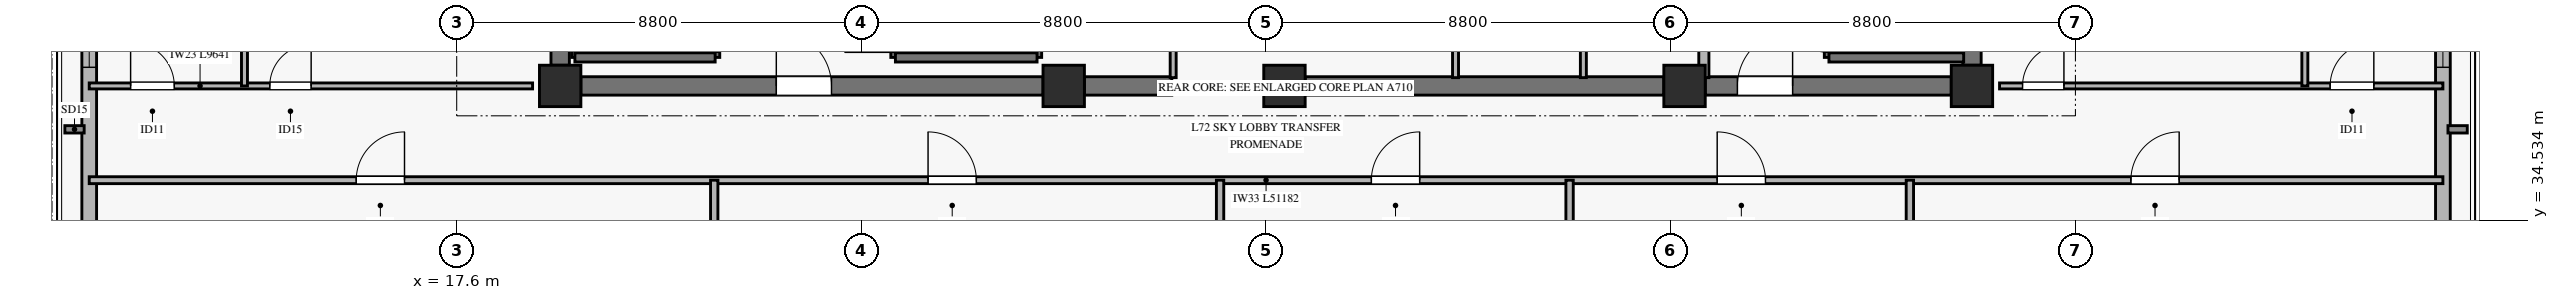
"""IFC4 building model, lengths in metres.
Left out: names, types, materials, properties, quantities, classifications, styles, units other than length and angle.
Written with IfcOpenShell. Run it as: python <this file> out.ifc"""

import sys

from ifc_helpers import new_model, si_unit, direction, frame, frame_2d, origin, origin_2d, place, context, subcontext, project, spatial, rectangle, extrude, source, transform, mapped, element, fill, save


model = new_model("IFC4")
c1 = context("Model", 3, precision=1e-05, world=origin(), true_north=direction((0.0, 1.0)))
c2 = subcontext(c1, "Body", "Model", "MODEL_VIEW")
j1 = project(units=[si_unit("LENGTHUNIT", "METRE"), si_unit("PLANEANGLEUNIT", "RADIAN")], contexts=[c1])
p1 = place(None, origin())
s1 = spatial("IfcSite", under=j1, at=p1, CompositionType="ELEMENT")
p2 = place(p1, origin())
s2 = spatial("IfcBuilding", under=s1, at=p2, CompositionType="ELEMENT")
p3 = place(p2, frame((0.0, 0.0, 279.1)))
s3 = spatial("IfcBuildingStorey", under=s2, at=p3, CompositionType="ELEMENT", Elevation=279.1)
m1 = source(origin(), c2, "Body", "SweptSolid", [
    extrude(rectangle(XDim=0.9, YDim=0.9, at=origin_2d()), origin(), (0.0, 0.0, 1.0), 6.52),
])
for number, where, z_axis, x_axis in (
    (1, (19.85, 37.45, 0.0), (0.0, 0.0, 1.0), (1.0, 0.0, 0.0)),
    (2, (30.8, 37.45, 0.0), (0.0, 0.0, 1.0), (1.0, 0.0, 0.0)),
    (3, (35.6, 37.45, 0.0), (0.0, 0.0, 1.0), (1.0, 0.0, 0.0)),
    (4, (44.3, 37.45, 0.0), (0.0, 0.0, 1.0), (1.0, 0.0, 0.0)),
    (5, (50.55, 37.45, 0.0), (0.0, 0.0, 1.0), (1.0, 0.0, 0.0)),
):
    element("IfcColumn", number, at=place(p3, frame(where, z_axis=z_axis, x_axis=x_axis)), inside=s3, PredefinedType="PILASTER", context=c2, shape_type="MappedRepresentation", body=[
        mapped(m1, transform((0.0, 0.0, 0.0), x_axis=(1.0, 0.0, 0.0), y_axis=(0.0, 1.0, 0.0), z_axis=(0.0, 0.0, 1.0), scale=1.0)),
    ])
p4 = place(p3, frame((20.3, 37.45, 0.0), z_axis=(0.0, 0.0, 1.0), x_axis=(1.0, 0.0, 0.0)))
e6 = element("IfcWall", 6, at=p4, inside=s3, PredefinedType="SHEAR", context=c2, shape_type="SweptSolid", body=[
    extrude(rectangle(XDim=10.05, YDim=0.4, at=frame_2d((5.025, 0.0))), origin(), (0.0, 0.0, 1.0), 6.52),
])
p5 = place(p4, frame((4.25, 0.0, 0.0)))
e7 = element("IfcOpeningElement", 7, at=p5, cuts=e6, PredefinedType="OPENING", context=c2, shape_type="SweptSolid", body=[
    extrude(rectangle(XDim=1.2, YDim=2.15, at=frame_2d((0.6, 1.075))), frame((0.0, 0.21, 0.0), z_axis=(0.0, -1.0, 0.0), x_axis=(1.0, 0.0, 0.0)), (0.0, 0.0, 1.0), 0.42),
])
p6 = place(p3, frame((31.25, 37.45, 0.0), z_axis=(0.0, 0.0, 1.0), x_axis=(1.0, 0.0, 0.0)))
e8 = element("IfcWall", 8, at=p6, inside=s3, PredefinedType="SHEAR", context=c2, shape_type="SweptSolid", body=[
    extrude(rectangle(XDim=1.9, YDim=0.4, at=frame_2d((0.95, 0.0))), origin(), (0.0, 0.0, 1.0), 6.52),
])
p7 = place(p3, frame((36.05, 37.45, 0.0), z_axis=(0.0, 0.0, 1.0), x_axis=(1.0, 0.0, 0.0)))
e9 = element("IfcWall", 9, at=p7, inside=s3, PredefinedType="SHEAR", context=c2, shape_type="SweptSolid", body=[
    extrude(rectangle(XDim=7.8, YDim=0.4, at=frame_2d((3.9, 0.0))), origin(), (0.0, 0.0, 1.0), 6.52),
])
p8 = place(p3, frame((44.75, 37.45, 0.0), z_axis=(0.0, 0.0, 1.0), x_axis=(1.0, 0.0, 0.0)))
e10 = element("IfcWall", 10, at=p8, inside=s3, PredefinedType="SHEAR", context=c2, shape_type="SweptSolid", body=[
    extrude(rectangle(XDim=5.35, YDim=0.4, at=frame_2d((2.675, 0.0))), origin(), (0.0, 0.0, 1.0), 6.52),
])
p9 = place(p8, frame((0.7, 0.0, 0.0)))
e11 = element("IfcOpeningElement", 11, at=p9, cuts=e10, PredefinedType="OPENING", context=c2, shape_type="SweptSolid", body=[
    extrude(rectangle(XDim=1.2, YDim=2.15, at=frame_2d((0.6, 1.075))), frame((0.0, 0.21, 0.0), z_axis=(0.0, -1.0, 0.0), x_axis=(1.0, 0.0, 0.0)), (0.0, 0.0, 1.0), 0.42),
])
for number, where, z_axis, x_axis in (
    (12, (19.85, 37.9, 0.0), (0.0, 0.0, 1.0), (0.0, 1.0, 0.0)),
    (13, (50.55, 37.9, 0.0), (0.0, 0.0, 1.0), (0.0, 1.0, 0.0)),
):
    element("IfcWall", number, at=place(p3, frame(where, z_axis=z_axis, x_axis=x_axis)), inside=s3, PredefinedType="SHEAR", context=c2, shape_type="SweptSolid", body=[
        extrude(rectangle(XDim=8.2, YDim=0.4, at=frame_2d((4.1, 0.0))), origin(), (0.0, 0.0, 1.0), 6.52),
    ])
p10 = place(p3, frame((9.609, 32.229, 0.0), z_axis=(0.0, 0.0, 1.0), x_axis=(0.0, 1.0, 0.0)))
e14 = element("IfcWall", 14, at=p10, inside=s3, PredefinedType="SOLIDWALL", context=c2, shape_type="SweptSolid", body=[
    extrude(rectangle(XDim=11.393, YDim=0.32, at=frame_2d((5.697, 0.0))), origin(), (0.0, 0.0, 1.0), 6.15),
])
p11 = place(p10, frame((5.626, 0.0, 0.45)))
e15 = element("IfcOpeningElement", 15, at=p11, cuts=e14, PredefinedType="OPENING", context=c2, shape_type="SweptSolid", body=[
    extrude(rectangle(XDim=2.6, YDim=2.4, at=frame_2d((1.3, 1.2))), frame((0.0, 0.17, 0.0), z_axis=(0.0, -1.0, 0.0), x_axis=(1.0, 0.0, 0.0)), (0.0, 0.0, 1.0), 0.34),
])
p12 = place(p3, frame((60.791, 32.229, 0.0), z_axis=(0.0, 0.0, 1.0), x_axis=(0.0, 1.0, 0.0)))
e16 = element("IfcWall", 16, at=p12, inside=s3, PredefinedType="SOLIDWALL", context=c2, shape_type="SweptSolid", body=[
    extrude(rectangle(XDim=11.393, YDim=0.32, at=frame_2d((5.697, 0.0))), origin(), (0.0, 0.0, 1.0), 6.15),
])
p13 = place(p12, frame((5.626, 0.0, 0.45)))
e17 = element("IfcOpeningElement", 17, at=p13, cuts=e16, PredefinedType="OPENING", context=c2, shape_type="SweptSolid", body=[
    extrude(rectangle(XDim=2.6, YDim=2.4, at=frame_2d((1.3, 1.2))), frame((0.0, 0.17, 0.0), z_axis=(0.0, -1.0, 0.0), x_axis=(1.0, 0.0, 0.0)), (0.0, 0.0, 1.0), 0.34),
])
p14 = place(p3, frame((20.17, 38.07, 0.0), z_axis=(0.0, 0.0, 1.0), x_axis=(0.0, 1.0, 0.0)))
e18 = element("IfcWall", 18, at=p14, inside=s3, PredefinedType="SOLIDWALL", context=c2, shape_type="SweptSolid", body=[
    extrude(rectangle(XDim=7.25, YDim=0.14, at=frame_2d((3.625, 0.0))), origin(), (0.0, 0.0, 1.0), 6.8),
])
p15 = place(p3, frame((23.22, 38.07, 0.0), z_axis=(0.0, 0.0, 1.0), x_axis=(0.0, 1.0, 0.0)))
e19 = element("IfcWall", 19, at=p15, inside=s3, PredefinedType="SOLIDWALL", context=c2, shape_type="SweptSolid", body=[
    extrude(rectangle(XDim=7.25, YDim=0.2, at=frame_2d((3.625, 0.0))), origin(), (0.0, 0.0, 1.0), 6.8),
])
p16 = place(p15, frame((0.11, 0.0, 0.0)))
e20 = element("IfcOpeningElement", 20, at=p16, cuts=e19, PredefinedType="OPENING", context=c2, shape_type="SweptSolid", body=[
    extrude(rectangle(XDim=1.1, YDim=2.15, at=frame_2d((0.55, 1.075))), frame((0.0, 0.11, 0.0), z_axis=(0.0, -1.0, 0.0), x_axis=(1.0, 0.0, 0.0)), (0.0, 0.0, 1.0), 0.22),
])
p17 = place(p3, frame((20.17, 38.07, 0.0), z_axis=(0.0, 0.0, 1.0), x_axis=(1.0, 0.0, 0.0)))
e21 = element("IfcWall", 21, at=p17, inside=s3, PredefinedType="SOLIDWALL", context=c2, shape_type="SweptSolid", body=[
    extrude(rectangle(XDim=3.05, YDim=0.2, at=frame_2d((1.525, 0.0))), origin(), (0.0, 0.0, 1.0), 6.8),
])
p18 = place(p3, frame((27.14, 38.07, 0.0), z_axis=(0.0, 0.0, 1.0), x_axis=(0.0, 1.0, 0.0)))
e22 = element("IfcWall", 22, at=p18, inside=s3, PredefinedType="SOLIDWALL", context=c2, shape_type="SweptSolid", body=[
    extrude(rectangle(XDim=7.25, YDim=0.2, at=frame_2d((3.625, 0.0))), origin(), (0.0, 0.0, 1.0), 6.8),
])
p19 = place(p18, frame((0.11, 0.0, 0.0)))
e23 = element("IfcOpeningElement", 23, at=p19, cuts=e22, PredefinedType="OPENING", context=c2, shape_type="SweptSolid", body=[
    extrude(rectangle(XDim=1.1, YDim=2.15, at=frame_2d((0.55, 1.075))), frame((0.0, 0.11, 0.0), z_axis=(0.0, -1.0, 0.0), x_axis=(1.0, 0.0, 0.0)), (0.0, 0.0, 1.0), 0.22),
])
p20 = place(p3, frame((30.22, 38.07, 0.0), z_axis=(0.0, 0.0, 1.0), x_axis=(0.0, 1.0, 0.0)))
e24 = element("IfcWall", 24, at=p20, inside=s3, PredefinedType="SOLIDWALL", context=c2, shape_type="SweptSolid", body=[
    extrude(rectangle(XDim=7.25, YDim=0.2, at=frame_2d((3.625, 0.0))), origin(), (0.0, 0.0, 1.0), 6.8),
])
p21 = place(p3, frame((27.14, 38.07, 0.0), z_axis=(0.0, 0.0, 1.0), x_axis=(1.0, 0.0, 0.0)))
e25 = element("IfcWall", 25, at=p21, inside=s3, PredefinedType="SOLIDWALL", context=c2, shape_type="SweptSolid", body=[
    extrude(rectangle(XDim=3.08, YDim=0.2, at=frame_2d((1.54, 0.0))), origin(), (0.0, 0.0, 1.0), 6.8),
])
p22 = place(p3, frame((47.44, 38.07, 0.0), z_axis=(0.0, 0.0, 1.0), x_axis=(0.0, 1.0, 0.0)))
e26 = element("IfcWall", 26, at=p22, inside=s3, PredefinedType="SOLIDWALL", context=c2, shape_type="SweptSolid", body=[
    extrude(rectangle(XDim=7.25, YDim=0.2, at=frame_2d((3.625, 0.0))), origin(), (0.0, 0.0, 1.0), 6.8),
])
p23 = place(p22, frame((0.11, 0.0, 0.0)))
e27 = element("IfcOpeningElement", 27, at=p23, cuts=e26, PredefinedType="OPENING", context=c2, shape_type="SweptSolid", body=[
    extrude(rectangle(XDim=1.1, YDim=2.15, at=frame_2d((0.55, 1.075))), frame((0.0, 0.11, 0.0), z_axis=(0.0, -1.0, 0.0), x_axis=(1.0, 0.0, 0.0)), (0.0, 0.0, 1.0), 0.22),
])
p24 = place(p3, frame((47.44, 38.07, 0.0), z_axis=(0.0, 0.0, 1.0), x_axis=(1.0, 0.0, 0.0)))
e28 = element("IfcWall", 28, at=p24, inside=s3, PredefinedType="SOLIDWALL", context=c2, shape_type="SweptSolid", body=[
    extrude(rectangle(XDim=2.93, YDim=0.2, at=frame_2d((1.465, 0.0))), origin(), (0.0, 0.0, 1.0), 6.8),
])
p25 = place(p3, frame((44.72, 37.63, 0.0), z_axis=(0.0, 0.0, 1.0), x_axis=(0.0, 1.0, 0.0)))
e29 = element("IfcWall", 29, at=p25, inside=s3, PredefinedType="SOLIDWALL", context=c2, shape_type="SweptSolid", body=[
    extrude(rectangle(XDim=7.59, YDim=0.22, at=frame_2d((3.795, 0.0))), origin(), (0.0, 0.0, 1.0), 6.52),
])
p26 = place(p3, frame((33.18, 37.63, 0.0), z_axis=(0.0, 0.0, 1.0), x_axis=(0.0, 1.0, 0.0)))
e30 = element("IfcWall", 30, at=p26, inside=s3, PredefinedType="PARTITIONING", context=c2, shape_type="SweptSolid", body=[
    extrude(rectangle(XDim=6.52, YDim=0.13, at=frame_2d((3.26, 0.0))), origin(), (0.0, 0.0, 1.0), 5.605),
])
p27 = place(p26, frame((2.27, 0.0, 0.0)))
e31 = element("IfcOpeningElement", 31, at=p27, cuts=e30, PredefinedType="OPENING", context=c2, shape_type="SweptSolid", body=[
    extrude(rectangle(XDim=0.9, YDim=2.1, at=frame_2d((0.45, 1.05))), frame((0.0, 0.075, 0.0), z_axis=(0.0, -1.0, 0.0), x_axis=(1.0, 0.0, 0.0)), (0.0, 0.0, 1.0), 0.15),
])
p28 = place(p3, frame((39.32, 37.63, 0.0), z_axis=(0.0, 0.0, 1.0), x_axis=(0.0, 1.0, 0.0)))
e32 = element("IfcWall", 32, at=p28, inside=s3, PredefinedType="PARTITIONING", context=c2, shape_type="SweptSolid", body=[
    extrude(rectangle(XDim=8.74, YDim=0.13, at=frame_2d((4.37, 0.0))), origin(), (0.0, 0.0, 1.0), 6.52),
])
p29 = place(p28, frame((4.89, 0.0, 0.0)))
e33 = element("IfcOpeningElement", 33, at=p29, cuts=e32, PredefinedType="OPENING", context=c2, shape_type="SweptSolid", body=[
    extrude(rectangle(XDim=0.9, YDim=2.1, at=frame_2d((0.45, 1.05))), frame((0.0, 0.075, 0.0), z_axis=(0.0, -1.0, 0.0), x_axis=(1.0, 0.0, 0.0)), (0.0, 0.0, 1.0), 0.15),
])
p30 = place(p3, frame((42.1, 37.63, 0.0), z_axis=(0.0, 0.0, 1.0), x_axis=(0.0, 1.0, 0.0)))
e34 = element("IfcWall", 34, at=p30, inside=s3, PredefinedType="PARTITIONING", context=c2, shape_type="SweptSolid", body=[
    extrude(rectangle(XDim=8.74, YDim=0.13, at=frame_2d((4.37, 0.0))), origin(), (0.0, 0.0, 1.0), 6.52),
])
p31 = place(p30, frame((2.17, 0.0, 0.0)))
e35 = element("IfcOpeningElement", 35, at=p31, cuts=e34, PredefinedType="OPENING", context=c2, shape_type="SweptSolid", body=[
    extrude(rectangle(XDim=0.9, YDim=2.1, at=frame_2d((0.45, 1.05))), frame((0.0, 0.075, 0.0), z_axis=(0.0, -1.0, 0.0), x_axis=(1.0, 0.0, 0.0)), (0.0, 0.0, 1.0), 0.15),
])
p32 = place(p3, frame((9.609, 35.4, 0.0), z_axis=(0.0, 0.0, 1.0), x_axis=(1.0, 0.0, 0.0)))
e36 = element("IfcWall", 36, at=p32, inside=s3, PredefinedType="PARTITIONING", context=c2, shape_type="SweptSolid", body=[
    extrude(rectangle(XDim=51.182, YDim=0.15, at=frame_2d((25.591, 0.0))), origin(), (0.0, 0.0, 1.0), 5.805),
])
p33 = place(p32, frame((5.806, 0.0, 0.0)))
e37 = element("IfcOpeningElement", 37, at=p33, cuts=e36, PredefinedType="OPENING", context=c2, shape_type="SweptSolid", body=[
    extrude(rectangle(XDim=1.05, YDim=2.15, at=frame_2d((0.525, 1.075))), frame((0.0, 0.085, 0.0), z_axis=(0.0, -1.0, 0.0), x_axis=(1.0, 0.0, 0.0)), (0.0, 0.0, 1.0), 0.17),
])
p34 = place(p32, frame((18.241, 0.0, 0.0)))
e38 = element("IfcOpeningElement", 38, at=p34, cuts=e36, PredefinedType="OPENING", context=c2, shape_type="SweptSolid", body=[
    extrude(rectangle(XDim=1.05, YDim=2.15, at=frame_2d((0.525, 1.075))), frame((0.0, 0.085, 0.0), z_axis=(0.0, -1.0, 0.0), x_axis=(1.0, 0.0, 0.0)), (0.0, 0.0, 1.0), 0.17),
])
p35 = place(p32, frame((27.881, 0.0, 0.0)))
e39 = element("IfcOpeningElement", 39, at=p35, cuts=e36, PredefinedType="OPENING", context=c2, shape_type="SweptSolid", body=[
    extrude(rectangle(XDim=1.05, YDim=2.15, at=frame_2d((0.525, 1.075))), frame((0.0, 0.085, 0.0), z_axis=(0.0, -1.0, 0.0), x_axis=(1.0, 0.0, 0.0)), (0.0, 0.0, 1.0), 0.17),
])
p36 = place(p32, frame((35.401, 0.0, 0.0)))
e40 = element("IfcOpeningElement", 40, at=p36, cuts=e36, PredefinedType="OPENING", context=c2, shape_type="SweptSolid", body=[
    extrude(rectangle(XDim=1.05, YDim=2.15, at=frame_2d((0.525, 1.075))), frame((0.0, 0.085, 0.0), z_axis=(0.0, -1.0, 0.0), x_axis=(1.0, 0.0, 0.0)), (0.0, 0.0, 1.0), 0.17),
])
p37 = place(p32, frame((44.397, 0.0, 0.0)))
e41 = element("IfcOpeningElement", 41, at=p37, cuts=e36, PredefinedType="OPENING", context=c2, shape_type="SweptSolid", body=[
    extrude(rectangle(XDim=1.05, YDim=2.15, at=frame_2d((0.525, 1.075))), frame((0.0, 0.085, 0.0), z_axis=(0.0, -1.0, 0.0), x_axis=(1.0, 0.0, 0.0)), (0.0, 0.0, 1.0), 0.17),
])
for number, where, z_axis, x_axis in (
    (42, (23.2, 17.908, 0.0), (0.0, 0.0, 1.0), (0.0, 1.0, 0.0)),
    (43, (34.2, 17.908, 0.0), (0.0, 0.0, 1.0), (0.0, 1.0, 0.0)),
    (44, (41.8, 17.908, 0.0), (0.0, 0.0, 1.0), (0.0, 1.0, 0.0)),
    (45, (49.2, 17.908, 0.0), (0.0, 0.0, 1.0), (0.0, 1.0, 0.0)),
):
    element("IfcWall", number, at=place(p3, frame(where, z_axis=z_axis, x_axis=x_axis)), inside=s3, PredefinedType="PARTITIONING", context=c2, shape_type="SweptSolid", body=[
        extrude(rectangle(XDim=17.492, YDim=0.16, at=frame_2d((8.746, 0.0))), origin(), (0.0, 0.0, 1.0), 6.105),
    ])
p38 = place(p3, frame((9.609, 37.45, 0.0), z_axis=(0.0, 0.0, 1.0), x_axis=(1.0, 0.0, 0.0)))
e46 = element("IfcWall", 46, at=p38, inside=s3, PredefinedType="PARTITIONING", context=c2, shape_type="SweptSolid", body=[
    extrude(rectangle(XDim=9.641, YDim=0.13, at=frame_2d((4.821, 0.0))), origin(), (0.0, 0.0, 1.0), 6.155),
])
p39 = place(p38, frame((0.9, 0.0, 0.0)))
e47 = element("IfcOpeningElement", 47, at=p39, cuts=e46, PredefinedType="OPENING", context=c2, shape_type="SweptSolid", body=[
    extrude(rectangle(XDim=0.95, YDim=2.1, at=frame_2d((0.475, 1.05))), frame((0.0, 0.075, 0.0), z_axis=(0.0, -1.0, 0.0), x_axis=(1.0, 0.0, 0.0)), (0.0, 0.0, 1.0), 0.15),
])
p40 = place(p38, frame((3.926, 0.0, 0.0)))
e48 = element("IfcOpeningElement", 48, at=p40, cuts=e46, PredefinedType="OPENING", context=c2, shape_type="SweptSolid", body=[
    extrude(rectangle(XDim=0.9, YDim=2.1, at=frame_2d((0.45, 1.05))), frame((0.0, 0.075, 0.0), z_axis=(0.0, -1.0, 0.0), x_axis=(1.0, 0.0, 0.0)), (0.0, 0.0, 1.0), 0.15),
])
p41 = place(p3, frame((12.985, 37.45, 0.0), z_axis=(0.0, 0.0, 1.0), x_axis=(0.0, 1.0, 0.0)))
e49 = element("IfcWall", 49, at=p41, inside=s3, PredefinedType="PARTITIONING", context=c2, shape_type="SweptSolid", body=[
    extrude(rectangle(XDim=8.8, YDim=0.13, at=frame_2d((4.4, 0.0))), origin(), (0.0, 0.0, 1.0), 6.52),
])
p42 = place(p3, frame((51.15, 37.45, 0.0), z_axis=(0.0, 0.0, 1.0), x_axis=(1.0, 0.0, 0.0)))
e50 = element("IfcWall", 50, at=p42, inside=s3, PredefinedType="PARTITIONING", context=c2, shape_type="SweptSolid", body=[
    extrude(rectangle(XDim=9.641, YDim=0.13, at=frame_2d((4.821, 0.0))), origin(), (0.0, 0.0, 1.0), 6.155),
])
p43 = place(p42, frame((0.5, 0.0, 0.0)))
e51 = element("IfcOpeningElement", 51, at=p43, cuts=e50, PredefinedType="OPENING", context=c2, shape_type="SweptSolid", body=[
    extrude(rectangle(XDim=0.9, YDim=2.1, at=frame_2d((0.45, 1.05))), frame((0.0, 0.075, 0.0), z_axis=(0.0, -1.0, 0.0), x_axis=(1.0, 0.0, 0.0)), (0.0, 0.0, 1.0), 0.15),
])
p44 = place(p42, frame((7.189, 0.0, 0.0)))
e52 = element("IfcOpeningElement", 52, at=p44, cuts=e50, PredefinedType="OPENING", context=c2, shape_type="SweptSolid", body=[
    extrude(rectangle(XDim=0.95, YDim=2.1, at=frame_2d((0.475, 1.05))), frame((0.0, 0.075, 0.0), z_axis=(0.0, -1.0, 0.0), x_axis=(1.0, 0.0, 0.0)), (0.0, 0.0, 1.0), 0.15),
])
p45 = place(p3, frame((57.789, 37.45, 0.0), z_axis=(0.0, 0.0, 1.0), x_axis=(0.0, 1.0, 0.0)))
e53 = element("IfcWall", 53, at=p45, inside=s3, PredefinedType="PARTITIONING", context=c2, shape_type="SweptSolid", body=[
    extrude(rectangle(XDim=8.8, YDim=0.13, at=frame_2d((4.4, 0.0))), origin(), (0.0, 0.0, 1.0), 6.52),
])
m2 = source(origin(), c2, "Body", "SweptSolid", [
    extrude(rectangle(XDim=2.6, YDim=2.4, at=frame_2d((1.3, 1.2))), frame((0.0, 0.03, 0.0), z_axis=(0.0, -1.0, 0.0), x_axis=(1.0, 0.0, 0.0)), (0.0, 0.0, 1.0), 0.06),
])
p46 = place(p11, origin())
e54 = element("IfcWindow", 54, at=p46, inside=s3, PartitioningType="SINGLE_PANEL", PredefinedType="WINDOW", context=c2, shape_type="MappedRepresentation", body=[
    mapped(m2, transform((0.0, 0.0, 0.0), x_axis=(1.0, 0.0, 0.0), y_axis=(0.0, 1.0, 0.0), z_axis=(0.0, 0.0, 1.0), scale=1.0)),
])
fill(e15, e54)
p47 = place(p13, origin())
e55 = element("IfcWindow", 55, at=p47, inside=s3, PartitioningType="SINGLE_PANEL", PredefinedType="WINDOW", context=c2, shape_type="MappedRepresentation", body=[
    mapped(m2, transform((0.0, 0.0, 0.0), x_axis=(1.0, 0.0, 0.0), y_axis=(0.0, 1.0, 0.0), z_axis=(0.0, 0.0, 1.0), scale=1.0)),
])
fill(e17, e55)
m3 = source(origin(), c2, "Body", "SweptSolid", [
    extrude(rectangle(XDim=1.2, YDim=2.15, at=frame_2d((0.6, 1.075))), frame((0.0, 0.025, 0.0), z_axis=(0.0, -1.0, 0.0), x_axis=(1.0, 0.0, 0.0)), (0.0, 0.0, 1.0), 0.05),
])
p48 = place(p5, origin())
e56 = element("IfcDoor", 56, at=p48, inside=s3, OperationType="SINGLE_SWING_LEFT", PredefinedType="DOOR", context=c2, shape_type="MappedRepresentation", body=[
    mapped(m3, transform((0.0, 0.0, 0.0), x_axis=(1.0, 0.0, 0.0), y_axis=(0.0, 1.0, 0.0), z_axis=(0.0, 0.0, 1.0), scale=1.0)),
])
fill(e7, e56)
p49 = place(p9, origin())
e57 = element("IfcDoor", 57, at=p49, inside=s3, OperationType="SINGLE_SWING_RIGHT", PredefinedType="DOOR", context=c2, shape_type="MappedRepresentation", body=[
    mapped(m3, transform((0.0, 0.0, 0.0), x_axis=(1.0, 0.0, 0.0), y_axis=(0.0, 1.0, 0.0), z_axis=(0.0, 0.0, 1.0), scale=1.0)),
])
fill(e11, e57)
m4 = source(origin(), c2, "Body", "SweptSolid", [
    extrude(rectangle(XDim=1.05, YDim=2.15, at=frame_2d((0.525, 1.075))), frame((0.0, 0.025, 0.0), z_axis=(0.0, -1.0, 0.0), x_axis=(1.0, 0.0, 0.0)), (0.0, 0.0, 1.0), 0.05),
])
p50 = place(p33, origin())
e58 = element("IfcDoor", 58, at=p50, inside=s3, OperationType="SINGLE_SWING_RIGHT", PredefinedType="DOOR", context=c2, shape_type="MappedRepresentation", body=[
    mapped(m4, transform((0.0, 0.0, 0.0), x_axis=(1.0, 0.0, 0.0), y_axis=(0.0, 1.0, 0.0), z_axis=(0.0, 0.0, 1.0), scale=1.0)),
])
fill(e37, e58)
p51 = place(p34, origin())
e59 = element("IfcDoor", 59, at=p51, inside=s3, OperationType="SINGLE_SWING_LEFT", PredefinedType="DOOR", context=c2, shape_type="MappedRepresentation", body=[
    mapped(m4, transform((0.0, 0.0, 0.0), x_axis=(1.0, 0.0, 0.0), y_axis=(0.0, 1.0, 0.0), z_axis=(0.0, 0.0, 1.0), scale=1.0)),
])
fill(e38, e59)
p52 = place(p35, origin())
e60 = element("IfcDoor", 60, at=p52, inside=s3, OperationType="SINGLE_SWING_RIGHT", PredefinedType="DOOR", context=c2, shape_type="MappedRepresentation", body=[
    mapped(m4, transform((0.0, 0.0, 0.0), x_axis=(1.0, 0.0, 0.0), y_axis=(0.0, 1.0, 0.0), z_axis=(0.0, 0.0, 1.0), scale=1.0)),
])
fill(e39, e60)
p53 = place(p36, origin())
e61 = element("IfcDoor", 61, at=p53, inside=s3, OperationType="SINGLE_SWING_LEFT", PredefinedType="DOOR", context=c2, shape_type="MappedRepresentation", body=[
    mapped(m4, transform((0.0, 0.0, 0.0), x_axis=(1.0, 0.0, 0.0), y_axis=(0.0, 1.0, 0.0), z_axis=(0.0, 0.0, 1.0), scale=1.0)),
])
fill(e40, e61)
p54 = place(p37, origin())
e62 = element("IfcDoor", 62, at=p54, inside=s3, OperationType="SINGLE_SWING_RIGHT", PredefinedType="DOOR", context=c2, shape_type="MappedRepresentation", body=[
    mapped(m4, transform((0.0, 0.0, 0.0), x_axis=(1.0, 0.0, 0.0), y_axis=(0.0, 1.0, 0.0), z_axis=(0.0, 0.0, 1.0), scale=1.0)),
])
fill(e41, e62)
m5 = source(origin(), c2, "Body", "SweptSolid", [
    extrude(rectangle(XDim=0.95, YDim=2.1, at=frame_2d((0.475, 1.05))), frame((0.0, 0.025, 0.0), z_axis=(0.0, -1.0, 0.0), x_axis=(1.0, 0.0, 0.0)), (0.0, 0.0, 1.0), 0.05),
])
p55 = place(p39, origin())
e63 = element("IfcDoor", 63, at=p55, inside=s3, OperationType="SINGLE_SWING_LEFT", PredefinedType="DOOR", context=c2, shape_type="MappedRepresentation", body=[
    mapped(m5, transform((0.0, 0.0, 0.0), x_axis=(1.0, 0.0, 0.0), y_axis=(0.0, 1.0, 0.0), z_axis=(0.0, 0.0, 1.0), scale=1.0)),
])
fill(e47, e63)
m6 = source(origin(), c2, "Body", "SweptSolid", [
    extrude(rectangle(XDim=0.9, YDim=2.1, at=frame_2d((0.45, 1.05))), frame((0.0, 0.025, 0.0), z_axis=(0.0, -1.0, 0.0), x_axis=(1.0, 0.0, 0.0)), (0.0, 0.0, 1.0), 0.05),
])
p56 = place(p40, origin())
e64 = element("IfcDoor", 64, at=p56, inside=s3, OperationType="SINGLE_SWING_RIGHT", PredefinedType="DOOR", context=c2, shape_type="MappedRepresentation", body=[
    mapped(m6, transform((0.0, 0.0, 0.0), x_axis=(1.0, 0.0, 0.0), y_axis=(0.0, 1.0, 0.0), z_axis=(0.0, 0.0, 1.0), scale=1.0)),
])
fill(e48, e64)
p57 = place(p43, origin())
e65 = element("IfcDoor", 65, at=p57, inside=s3, OperationType="SINGLE_SWING_RIGHT", PredefinedType="DOOR", context=c2, shape_type="MappedRepresentation", body=[
    mapped(m6, transform((0.0, 0.0, 0.0), x_axis=(1.0, 0.0, 0.0), y_axis=(0.0, 1.0, 0.0), z_axis=(0.0, 0.0, 1.0), scale=1.0)),
])
fill(e51, e65)
p58 = place(p44, origin())
e66 = element("IfcDoor", 66, at=p58, inside=s3, OperationType="SINGLE_SWING_RIGHT", PredefinedType="DOOR", context=c2, shape_type="MappedRepresentation", body=[
    mapped(m5, transform((0.0, 0.0, 0.0), x_axis=(1.0, 0.0, 0.0), y_axis=(0.0, 1.0, 0.0), z_axis=(0.0, 0.0, 1.0), scale=1.0)),
])
fill(e52, e66)
save(model, sys.argv[1])
